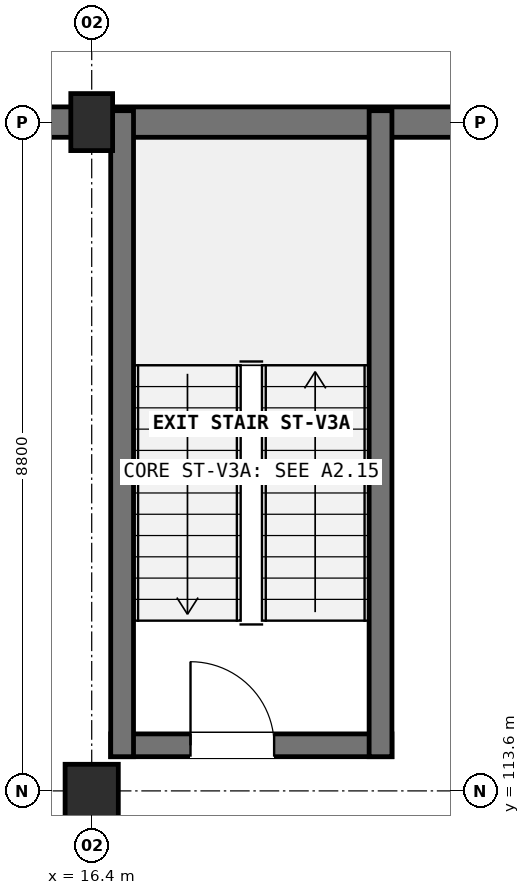
"""IFC4 building model, lengths in metres.
Left out: names, types, materials, properties, quantities, classifications, styles, units other than length and angle.
Written with IfcOpenShell. Run it as: python <this file> out.ifc"""

import sys

from ifc_helpers import new_model, si_unit, direction, frame, frame_2d, origin, origin_2d, place, context, subcontext, project, spatial, rectangle, extrude, element, fill, save


model = new_model("IFC4")
c1 = context("Model", 3, precision=1e-05, world=origin(), true_north=direction((0.0, 1.0)))
c2 = subcontext(c1, "Body", "Model", "MODEL_VIEW")
j1 = project(units=[si_unit("LENGTHUNIT", "METRE"), si_unit("PLANEANGLEUNIT", "RADIAN")], contexts=[c1])
p1 = place(None, origin())
s1 = spatial("IfcSite", under=j1, at=p1, CompositionType="ELEMENT")
p2 = place(p1, origin())
s2 = spatial("IfcBuilding", under=s1, at=p2, CompositionType="ELEMENT")
p3 = place(p2, frame((0.0, 0.0, -4.5)))
s3 = spatial("IfcBuildingStorey", under=s2, at=p3, CompositionType="ELEMENT", Elevation=-4.5)
p4 = place(p3, frame((16.4, 113.6, 0.0), z_axis=(0.0, 0.0, 1.0), x_axis=(1.0, 0.0, 0.0)))
e1 = element("IfcColumn", 1, at=p4, inside=s3, PredefinedType="COLUMN", context=c2, shape_type="SweptSolid", body=[
    extrude(rectangle(XDim=0.7, YDim=0.7, at=origin_2d()), origin(), (0.0, 0.0, 1.0), 4.5),
])
p5 = place(p3, frame((16.4, 122.4, 0.0), z_axis=(0.0, 0.0, 1.0), x_axis=(1.0, 0.0, 0.0)))
e2 = element("IfcColumn", 2, at=p5, inside=s3, PredefinedType="COLUMN", context=c2, shape_type="SweptSolid", body=[
    extrude(rectangle(XDim=0.55, YDim=0.75, at=origin_2d()), origin(), (0.0, 0.0, 1.0), 4.5),
])
p6 = place(p3, frame((176.2, 122.4, 0.0), z_axis=(0.0, 0.0, 1.0), x_axis=(-1.0, 0.0, 0.0)))
e3 = element("IfcWall", 3, at=p6, inside=s3, PredefinedType="USERDEFINED", context=c2, shape_type="SweptSolid", body=[
    extrude(rectangle(XDim=168.4, YDim=0.4, at=frame_2d((84.2, 0.0))), origin(), (0.0, 0.0, 1.0), 4.5),
])
p7 = place(p3, frame((16.65, 114.2, 0.0), z_axis=(0.0, 0.0, 1.0), x_axis=(1.0, 0.0, 0.0)))
e4 = element("IfcWall", 4, at=p7, inside=s3, PredefinedType="SHEAR", context=c2, shape_type="SweptSolid", body=[
    extrude(rectangle(XDim=3.7, YDim=0.3, at=frame_2d((1.85, 0.0))), origin(), (0.0, 0.0, 1.0), 4.5),
])
p8 = place(p7, frame((1.05, 0.0, 0.0)))
e5 = element("IfcOpeningElement", 5, at=p8, cuts=e4, PredefinedType="OPENING", context=c2, shape_type="SweptSolid", body=[
    extrude(rectangle(XDim=1.1, YDim=2.2, at=frame_2d((0.55, 1.1))), frame((0.0, 0.16, 0.0), z_axis=(0.0, -1.0, 0.0), x_axis=(1.0, 0.0, 0.0)), (0.0, 0.0, 1.0), 0.32),
])
for number, where, z_axis, x_axis in (
    (6, (16.8, 114.05, 0.0), (0.0, 0.0, 1.0), (0.0, 1.0, 0.0)),
    (7, (20.2, 114.05, 0.0), (0.0, 0.0, 1.0), (0.0, 1.0, 0.0)),
):
    element("IfcWall", number, at=place(p3, frame(where, z_axis=z_axis, x_axis=x_axis)), inside=s3, PredefinedType="SHEAR", context=c2, shape_type="SweptSolid", body=[
        extrude(rectangle(XDim=8.5, YDim=0.3, at=frame_2d((4.25, 0.0))), origin(), (0.0, 0.0, 1.0), 4.5),
    ])
p9 = place(p8, origin())
e8 = element("IfcDoor", 8, at=p9, inside=s3, OperationType="SINGLE_SWING_LEFT", PredefinedType="DOOR", context=c2, shape_type="SweptSolid", body=[
    extrude(rectangle(XDim=1.1, YDim=2.2, at=frame_2d((0.55, 1.1))), frame((0.0, 0.025, 0.0), z_axis=(0.0, -1.0, 0.0), x_axis=(1.0, 0.0, 0.0)), (0.0, 0.0, 1.0), 0.05),
])
fill(e5, e8)
save(model, sys.argv[1])
